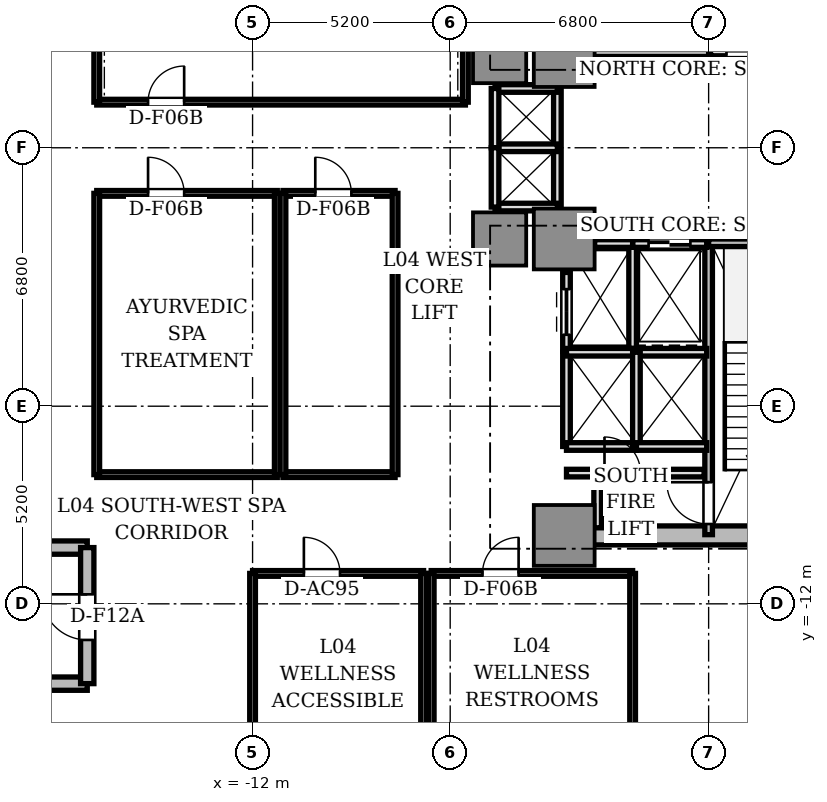
"""IFC4 building model, lengths in metres.
Left out: names, types, materials, properties, quantities, classifications, styles, units other than length and angle.
Written with IfcOpenShell. Run it as: python <this file> out.ifc"""

import sys

from ifc_helpers import new_model, si_unit, direction, frame, frame_2d, origin, origin_2d, place, context, subcontext, project, spatial, rectangle, extrude, source, transform, mapped, element, fill, save


model = new_model("IFC4")
c1 = context("Model", 3, precision=1e-05, world=origin(), true_north=direction((0.0, 1.0)))
c2 = subcontext(c1, "Body", "Model", "MODEL_VIEW")
j1 = project(units=[si_unit("LENGTHUNIT", "METRE"), si_unit("PLANEANGLEUNIT", "RADIAN")], contexts=[c1])
p1 = place(None, origin())
s1 = spatial("IfcSite", under=j1, at=p1, CompositionType="ELEMENT")
p2 = place(p1, origin())
s2 = spatial("IfcBuilding", under=s1, at=p2, CompositionType="ELEMENT")
p3 = place(p2, frame((0.0, 0.0, 18.6)))
s3 = spatial("IfcBuildingStorey", under=s2, at=p3, CompositionType="ELEMENT", Elevation=18.6)
p4 = place(p3, frame((-3.55, -10.2, 0.0), z_axis=(0.0, 0.0, 1.0), x_axis=(1.0, 0.0, 0.0)))
e1 = element("IfcWall", 1, at=p4, inside=s3, PredefinedType="SHEAR", context=c2, shape_type="SweptSolid", body=[
    extrude(rectangle(XDim=7.1, YDim=0.5, at=frame_2d((3.55, 0.0))), origin(), (0.0, 0.0, 1.0), 4.26),
])
m1 = source(origin(), c2, "Body", "SweptSolid", [
    extrude(rectangle(XDim=1.6, YDim=1.6, at=origin_2d()), origin(), (0.0, 0.0, 1.0), 4.26),
])
for number, where, z_axis, x_axis in (
    (2, (-3.8, 2.4, 0.0), (0.0, 0.0, 1.0), (1.0, 0.0, 0.0)),
    (3, (-3.8, -2.4, 0.0), (0.0, 0.0, 1.0), (1.0, 0.0, 0.0)),
    (4, (-3.8, -10.2, 0.0), (0.0, 0.0, 1.0), (1.0, 0.0, 0.0)),
):
    element("IfcColumn", number, at=place(p3, frame(where, z_axis=z_axis, x_axis=x_axis)), inside=s3, PredefinedType="COLUMN", context=c2, shape_type="MappedRepresentation", body=[
        mapped(m1, transform((0.0, 0.0, 0.0), scale=1.0)),
    ])
m2 = source(origin(), c2, "Body", "SweptSolid", [
    extrude(rectangle(XDim=1.4, YDim=1.4, at=origin_2d()), origin(), (0.0, 0.0, 1.0), 4.26),
])
for number, where, z_axis, x_axis in (
    (5, (-5.5, 2.4, 0.0), (0.0, 0.0, 1.0), (1.0, 0.0, 0.0)),
    (6, (-5.5, -2.4, 0.0), (0.0, 0.0, 1.0), (1.0, 0.0, 0.0)),
):
    element("IfcColumn", number, at=place(p3, frame(where, z_axis=z_axis, x_axis=x_axis)), inside=s3, PredefinedType="COLUMN", context=c2, shape_type="MappedRepresentation", body=[
        mapped(m2, transform((0.0, 0.0, 0.0), scale=1.0)),
    ])
p5 = place(p3, frame((0.0, 2.5, 0.0), z_axis=(0.0, 0.0, 1.0), x_axis=(0.0, 1.0, 0.0)))
e7 = element("IfcWall", 7, at=p5, inside=s3, PredefinedType="SOLIDWALL", context=c2, shape_type="SweptSolid", body=[
    extrude(rectangle(XDim=7.68, YDim=0.2, at=frame_2d((3.84, 0.0))), origin(), (0.0, 0.0, 1.0), 4.26),
])
p6 = place(p5, frame((6.5, 0.0, 0.0)))
e8 = element("IfcOpeningElement", 8, at=p6, cuts=e7, PredefinedType="OPENING", context=c2, shape_type="SweptSolid", body=[
    extrude(rectangle(XDim=0.95, YDim=2.15, at=frame_2d((0.475, 1.075))), frame((0.0, 0.11, 0.0), z_axis=(0.0, -1.0, 0.0), x_axis=(1.0, 0.0, 0.0)), (0.0, 0.0, 1.0), 0.22),
])
p7 = place(p3, frame((-3.72, 2.5, 0.0), z_axis=(0.0, 0.0, 1.0), x_axis=(1.0, 0.0, 0.0)))
e9 = element("IfcWall", 9, at=p7, inside=s3, PredefinedType="SOLIDWALL", context=c2, shape_type="SweptSolid", body=[
    extrude(rectangle(XDim=3.72, YDim=0.2, at=frame_2d((1.86, 0.0))), origin(), (0.0, 0.0, 1.0), 4.26),
])
p8 = place(p3, frame((0.0, -10.18, 0.0), z_axis=(0.0, 0.0, 1.0), x_axis=(0.0, 1.0, 0.0)))
e10 = element("IfcWall", 10, at=p8, inside=s3, PredefinedType="SOLIDWALL", context=c2, shape_type="SweptSolid", body=[
    extrude(rectangle(XDim=7.68, YDim=0.2, at=frame_2d((3.84, 0.0))), origin(), (0.0, 0.0, 1.0), 4.26),
])
p9 = place(p8, frame((0.28, 0.0, 0.0)))
e11 = element("IfcOpeningElement", 11, at=p9, cuts=e10, PredefinedType="OPENING", context=c2, shape_type="SweptSolid", body=[
    extrude(rectangle(XDim=1.1, YDim=2.15, at=frame_2d((0.55, 1.075))), frame((0.0, 0.11, 0.0), z_axis=(0.0, -1.0, 0.0), x_axis=(1.0, 0.0, 0.0)), (0.0, 0.0, 1.0), 0.22),
])
p10 = place(p3, frame((0.0, -2.5, 0.0), z_axis=(0.0, 0.0, 1.0), x_axis=(1.0, 0.0, 0.0)))
e12 = element("IfcWall", 12, at=p10, inside=s3, PredefinedType="SOLIDWALL", context=c2, shape_type="SweptSolid", body=[
    extrude(rectangle(XDim=3.72, YDim=0.2, at=frame_2d((1.86, 0.0))), origin(), (0.0, 0.0, 1.0), 4.26),
])
p11 = place(p3, frame((0.05, 2.52, 0.0), z_axis=(0.0, 0.0, 1.0), x_axis=(1.0, 0.0, 0.0)))
e13 = element("IfcWall", 13, at=p11, inside=s3, PredefinedType="SOLIDWALL", context=c2, shape_type="SweptSolid", body=[
    extrude(rectangle(XDim=1.95, YDim=0.2, at=frame_2d((0.975, 0.0))), origin(), (0.0, 0.0, 1.0), 3.81),
])
p12 = place(p11, frame((0.42, 0.0, 0.0)))
e14 = element("IfcOpeningElement", 14, at=p12, cuts=e13, PredefinedType="OPENING", context=c2, shape_type="SweptSolid", body=[
    extrude(rectangle(XDim=1.1, YDim=2.2, at=frame_2d((0.55, 1.1))), frame((0.0, 0.11, 0.0), z_axis=(0.0, -1.0, 0.0), x_axis=(1.0, 0.0, 0.0)), (0.0, 0.0, 1.0), 0.22),
])
p13 = place(p3, frame((-2.0, -5.28, 0.0), z_axis=(0.0, 0.0, 1.0), x_axis=(0.0, 1.0, 0.0)))
e15 = element("IfcWall", 15, at=p13, inside=s3, PredefinedType="SOLIDWALL", context=c2, shape_type="SweptSolid", body=[
    extrude(rectangle(XDim=2.78, YDim=0.2, at=frame_2d((1.39, 0.0))), origin(), (0.0, 0.0, 1.0), 3.81),
])
p14 = place(p3, frame((-2.0, -2.52, 0.0), z_axis=(0.0, 0.0, 1.0), x_axis=(1.0, 0.0, 0.0)))
e16 = element("IfcWall", 16, at=p14, inside=s3, PredefinedType="SOLIDWALL", context=c2, shape_type="SweptSolid", body=[
    extrude(rectangle(XDim=1.95, YDim=0.2, at=frame_2d((0.975, 0.0))), origin(), (0.0, 0.0, 1.0), 3.81),
])
p15 = place(p14, frame((0.42, 0.0, 0.0)))
e17 = element("IfcOpeningElement", 17, at=p15, cuts=e16, PredefinedType="OPENING", context=c2, shape_type="SweptSolid", body=[
    extrude(rectangle(XDim=1.1, YDim=2.2, at=frame_2d((0.55, 1.1))), frame((0.0, 0.11, 0.0), z_axis=(0.0, -1.0, 0.0), x_axis=(1.0, 0.0, 0.0)), (0.0, 0.0, 1.0), 0.22),
])
p16 = place(p3, frame((-3.0, -2.52, 0.0), z_axis=(0.0, 0.0, 1.0), x_axis=(1.0, 0.0, 0.0)))
e18 = element("IfcWall", 18, at=p16, inside=s3, PredefinedType="SOLIDWALL", context=c2, shape_type="SweptSolid", body=[
    extrude(rectangle(XDim=1.0, YDim=0.2, at=frame_2d((0.5, 0.0))), origin(), (0.0, 0.0, 1.0), 3.81),
])
p17 = place(p3, frame((-3.74, -5.36, 0.0), z_axis=(0.0, 0.0, 1.0), x_axis=(0.0, 1.0, 0.0)))
e19 = element("IfcWall", 19, at=p17, inside=s3, PredefinedType="SOLIDWALL", context=c2, shape_type="SweptSolid", body=[
    extrude(rectangle(XDim=2.08, YDim=0.2, at=frame_2d((1.04, 0.0))), origin(), (0.0, 0.0, 1.0), 3.81),
])
p18 = place(p17, frame((0.44, 0.0, 0.0)))
e20 = element("IfcOpeningElement", 20, at=p18, cuts=e19, PredefinedType="OPENING", context=c2, shape_type="SweptSolid", body=[
    extrude(rectangle(XDim=1.2, YDim=2.2, at=frame_2d((0.6, 1.1))), frame((0.0, 0.11, 0.0), z_axis=(0.0, -1.0, 0.0), x_axis=(1.0, 0.0, 0.0)), (0.0, 0.0, 1.0), 0.22),
])
p19 = place(p3, frame((-3.74, -7.86, 0.0), z_axis=(0.0, 0.0, 1.0), x_axis=(0.0, 1.0, 0.0)))
e21 = element("IfcWall", 21, at=p19, inside=s3, PredefinedType="SOLIDWALL", context=c2, shape_type="SweptSolid", body=[
    extrude(rectangle(XDim=2.48, YDim=0.2, at=frame_2d((1.24, 0.0))), origin(), (0.0, 0.0, 1.0), 3.81),
])
p20 = place(p3, frame((-3.74, -7.86, 0.0), z_axis=(0.0, 0.0, 1.0), x_axis=(1.0, 0.0, 0.0)))
e22 = element("IfcWall", 22, at=p20, inside=s3, PredefinedType="SOLIDWALL", context=c2, shape_type="SweptSolid", body=[
    extrude(rectangle(XDim=1.84, YDim=0.2, at=frame_2d((0.92, 0.0))), origin(), (0.0, 0.0, 1.0), 3.81),
])
p21 = place(p3, frame((-3.74, -5.38, 0.0), z_axis=(0.0, 0.0, 1.0), x_axis=(1.0, 0.0, 0.0)))
e23 = element("IfcWall", 23, at=p21, inside=s3, PredefinedType="SOLIDWALL", context=c2, shape_type="SweptSolid", body=[
    extrude(rectangle(XDim=3.69, YDim=0.2, at=frame_2d((1.845, 0.0))), origin(), (0.0, 0.0, 1.0), 3.81),
])
p22 = place(p3, frame((-1.9, -7.86, 0.0), z_axis=(0.0, 0.0, 1.0), x_axis=(0.0, 1.0, 0.0)))
e24 = element("IfcWall", 24, at=p22, inside=s3, PredefinedType="SOLIDWALL", context=c2, shape_type="SweptSolid", body=[
    extrude(rectangle(XDim=2.48, YDim=0.2, at=frame_2d((1.24, 0.0))), origin(), (0.0, 0.0, 1.0), 3.81),
])
p23 = place(p3, frame((-1.9, -7.86, 0.0), z_axis=(0.0, 0.0, 1.0), x_axis=(1.0, 0.0, 0.0)))
e25 = element("IfcWall", 25, at=p23, inside=s3, PredefinedType="SOLIDWALL", context=c2, shape_type="SweptSolid", body=[
    extrude(rectangle(XDim=1.85, YDim=0.2, at=frame_2d((0.925, 0.0))), origin(), (0.0, 0.0, 1.0), 3.81),
])
p24 = place(p3, frame((-3.98, -1.56, 0.0), z_axis=(0.0, 0.0, 1.0), x_axis=(0.0, 1.0, 0.0)))
e26 = element("IfcWall", 26, at=p24, inside=s3, PredefinedType="SOLIDWALL", context=c2, shape_type="SweptSolid", body=[
    extrude(rectangle(XDim=3.12, YDim=0.2, at=frame_2d((1.56, 0.0))), origin(), (0.0, 0.0, 1.0), 3.33),
])
for number, where, z_axis, x_axis in (
    (27, (-5.62, 1.56, 0.0), (0.0, 0.0, 1.0), (1.0, 0.0, 0.0)),
    (28, (-5.62, -1.56, 0.0), (0.0, 0.0, 1.0), (1.0, 0.0, 0.0)),
    (29, (-5.62, 0.0, 0.0), (0.0, 0.0, 1.0), (1.0, 0.0, 0.0)),
):
    element("IfcWall", number, at=place(p3, frame(where, z_axis=z_axis, x_axis=x_axis)), inside=s3, PredefinedType="SOLIDWALL", context=c2, shape_type="SweptSolid", body=[
        extrude(rectangle(XDim=1.64, YDim=0.2, at=frame_2d((0.82, 0.0))), origin(), (0.0, 0.0, 1.0), 3.81),
    ])
for number, where, z_axis, x_axis in (
    (30, (-5.62, 0.0, 0.0), (0.0, 0.0, 1.0), (0.0, 1.0, 0.0)),
    (31, (-5.62, -1.56, 0.0), (0.0, 0.0, 1.0), (0.0, 1.0, 0.0)),
):
    element("IfcWall", number, at=place(p3, frame(where, z_axis=z_axis, x_axis=x_axis)), inside=s3, PredefinedType="SOLIDWALL", context=c2, shape_type="SweptSolid", body=[
        extrude(rectangle(XDim=1.56, YDim=0.2, at=frame_2d((0.78, 0.0))), origin(), (0.0, 0.0, 1.0), 3.81),
    ])
p25 = place(p3, frame((-3.74, -8.56, 0.0), z_axis=(0.0, 0.0, 1.0), x_axis=(1.0, 0.0, 0.0)))
e32 = element("IfcWall", 32, at=p25, inside=s3, PredefinedType="SOLIDWALL", context=c2, shape_type="SweptSolid", body=[
    extrude(rectangle(XDim=3.62, YDim=0.2, at=frame_2d((1.81, 0.0))), origin(), (0.0, 0.0, 1.0), 3.81),
])
p26 = place(p25, frame((1.0, 0.0, 0.0)))
e33 = element("IfcOpeningElement", 33, at=p26, cuts=e32, PredefinedType="OPENING", context=c2, shape_type="SweptSolid", body=[
    extrude(rectangle(XDim=0.95, YDim=2.15, at=frame_2d((0.475, 1.075))), frame((0.0, 0.11, 0.0), z_axis=(0.0, -1.0, 0.0), x_axis=(1.0, 0.0, 0.0)), (0.0, 0.0, 1.0), 0.22),
])
p27 = place(p3, frame((-2.92, -10.0, 0.0), z_axis=(0.0, 0.0, 1.0), x_axis=(0.0, 1.0, 0.0)))
e34 = element("IfcWall", 34, at=p27, inside=s3, PredefinedType="SOLIDWALL", context=c2, shape_type="SweptSolid", body=[
    extrude(rectangle(XDim=1.44, YDim=0.2, at=frame_2d((0.72, 0.0))), origin(), (0.0, 0.0, 1.0), 3.81),
])
for number, where, z_axis, x_axis in (
    (35, (-26.6, -10.52, 0.0), (0.0, 0.0, 1.0), (1.0, 0.0, 0.0)),
    (36, (-26.6, -14.1, 0.0), (0.0, 0.0, 1.0), (1.0, 0.0, 0.0)),
):
    element("IfcWall", number, at=place(p3, frame(where, z_axis=z_axis, x_axis=x_axis)), inside=s3, PredefinedType="SHEAR", context=c2, shape_type="SweptSolid", body=[
        extrude(rectangle(XDim=10.25, YDim=0.35, at=frame_2d((5.125, 0.0))), origin(), (0.0, 0.0, 1.0), 4.26),
    ])
p28 = place(p3, frame((-16.35, -14.1, 0.0), z_axis=(0.0, 0.0, 1.0), x_axis=(0.0, 1.0, 0.0)))
e37 = element("IfcWall", 37, at=p28, inside=s3, PredefinedType="SHEAR", context=c2, shape_type="SweptSolid", body=[
    extrude(rectangle(XDim=3.58, YDim=0.35, at=frame_2d((1.79, 0.0))), origin(), (0.0, 0.0, 1.0), 4.26),
])
p29 = place(p28, frame((1.15, 0.0, 0.0)))
e38 = element("IfcOpeningElement", 38, at=p29, cuts=e37, PredefinedType="OPENING", context=c2, shape_type="SweptSolid", body=[
    extrude(rectangle(XDim=1.2, YDim=2.2, at=frame_2d((0.6, 1.1))), frame((0.0, 0.185, 0.0), z_axis=(0.0, -1.0, 0.0), x_axis=(1.0, 0.0, 0.0)), (0.0, 0.0, 1.0), 0.37),
])
p30 = place(p3, frame((-16.1, 1.2, 0.0), z_axis=(0.0, 0.0, 1.0), x_axis=(1.0, 0.0, 0.0)))
e39 = element("IfcWall", 39, at=p30, inside=s3, PredefinedType="PARTITIONING", context=c2, shape_type="SweptSolid", body=[
    extrude(rectangle(XDim=9.7, YDim=0.15, at=frame_2d((4.85, 0.0))), origin(), (0.0, 0.0, 1.0), 3.81),
])
p31 = place(p30, frame((1.35, 0.0, 0.0)))
e40 = element("IfcOpeningElement", 40, at=p31, cuts=e39, PredefinedType="OPENING", context=c2, shape_type="SweptSolid", body=[
    extrude(rectangle(XDim=0.95, YDim=2.15, at=frame_2d((0.475, 1.075))), frame((0.0, 0.085, 0.0), z_axis=(0.0, -1.0, 0.0), x_axis=(1.0, 0.0, 0.0)), (0.0, 0.0, 1.0), 0.17),
])
for number, where, z_axis, x_axis in (
    (41, (-16.1, 1.2, 0.0), (0.0, 0.0, 1.0), (0.0, 1.0, 0.0)),
    (42, (-6.4, 1.2, 0.0), (0.0, 0.0, 1.0), (0.0, 1.0, 0.0)),
):
    element("IfcWall", number, at=place(p3, frame(where, z_axis=z_axis, x_axis=x_axis)), inside=s3, PredefinedType="PARTITIONING", context=c2, shape_type="SweptSolid", body=[
        extrude(rectangle(XDim=7.4, YDim=0.15, at=frame_2d((3.7, 0.0))), origin(), (0.0, 0.0, 1.0), 3.81),
    ])
p32 = place(p3, frame((-16.1, -1.2, 0.0), z_axis=(0.0, 0.0, 1.0), x_axis=(1.0, 0.0, 0.0)))
e43 = element("IfcWall", 43, at=p32, inside=s3, PredefinedType="PARTITIONING", context=c2, shape_type="SweptSolid", body=[
    extrude(rectangle(XDim=4.75, YDim=0.15, at=frame_2d((2.375, 0.0))), origin(), (0.0, 0.0, 1.0), 3.81),
])
p33 = place(p32, frame((1.35, 0.0, 0.0)))
e44 = element("IfcOpeningElement", 44, at=p33, cuts=e43, PredefinedType="OPENING", context=c2, shape_type="SweptSolid", body=[
    extrude(rectangle(XDim=0.95, YDim=2.15, at=frame_2d((0.475, 1.075))), frame((0.0, 0.085, 0.0), z_axis=(0.0, -1.0, 0.0), x_axis=(1.0, 0.0, 0.0)), (0.0, 0.0, 1.0), 0.17),
])
p34 = place(p3, frame((-16.1, -8.6, 0.0), z_axis=(0.0, 0.0, 1.0), x_axis=(1.0, 0.0, 0.0)))
e45 = element("IfcWall", 45, at=p34, inside=s3, PredefinedType="PARTITIONING", context=c2, shape_type="SweptSolid", body=[
    extrude(rectangle(XDim=4.75, YDim=0.15, at=frame_2d((2.375, 0.0))), origin(), (0.0, 0.0, 1.0), 3.81),
])
for number, where, z_axis, x_axis in (
    (46, (-16.1, -8.6, 0.0), (0.0, 0.0, 1.0), (0.0, 1.0, 0.0)),
    (47, (-11.35, -8.6, 0.0), (0.0, 0.0, 1.0), (0.0, 1.0, 0.0)),
):
    element("IfcWall", number, at=place(p3, frame(where, z_axis=z_axis, x_axis=x_axis)), inside=s3, PredefinedType="PARTITIONING", context=c2, shape_type="SweptSolid", body=[
        extrude(rectangle(XDim=7.4, YDim=0.15, at=frame_2d((3.7, 0.0))), origin(), (0.0, 0.0, 1.0), 3.81),
    ])
p35 = place(p3, frame((-12.0, -11.2, 0.0), z_axis=(0.0, 0.0, 1.0), x_axis=(1.0, 0.0, 0.0)))
e48 = element("IfcWall", 48, at=p35, inside=s3, PredefinedType="PARTITIONING", context=c2, shape_type="SweptSolid", body=[
    extrude(rectangle(XDim=4.5, YDim=0.15, at=frame_2d((2.25, 0.0))), origin(), (0.0, 0.0, 1.0), 3.81),
])
p36 = place(p35, frame((1.35, 0.0, 0.0)))
e49 = element("IfcOpeningElement", 49, at=p36, cuts=e48, PredefinedType="OPENING", context=c2, shape_type="SweptSolid", body=[
    extrude(rectangle(XDim=0.95, YDim=2.15, at=frame_2d((0.475, 1.075))), frame((0.0, 0.085, 0.0), z_axis=(0.0, -1.0, 0.0), x_axis=(1.0, 0.0, 0.0)), (0.0, 0.0, 1.0), 0.17),
])
for number, where, z_axis, x_axis in (
    (50, (-12.0, -15.5, 0.0), (0.0, 0.0, 1.0), (0.0, 1.0, 0.0)),
    (51, (-7.5, -15.5, 0.0), (0.0, 0.0, 1.0), (0.0, 1.0, 0.0)),
):
    element("IfcWall", number, at=place(p3, frame(where, z_axis=z_axis, x_axis=x_axis)), inside=s3, PredefinedType="PARTITIONING", context=c2, shape_type="SweptSolid", body=[
        extrude(rectangle(XDim=4.3, YDim=0.15, at=frame_2d((2.15, 0.0))), origin(), (0.0, 0.0, 1.0), 3.81),
    ])
p37 = place(p3, frame((-7.3, -11.2, 0.0), z_axis=(0.0, 0.0, 1.0), x_axis=(1.0, 0.0, 0.0)))
e52 = element("IfcWall", 52, at=p37, inside=s3, PredefinedType="PARTITIONING", context=c2, shape_type="SweptSolid", body=[
    extrude(rectangle(XDim=5.3, YDim=0.15, at=frame_2d((2.65, 0.0))), origin(), (0.0, 0.0, 1.0), 3.81),
])
p38 = place(p37, frame((1.35, 0.0, 0.0)))
e53 = element("IfcOpeningElement", 53, at=p38, cuts=e52, PredefinedType="OPENING", context=c2, shape_type="SweptSolid", body=[
    extrude(rectangle(XDim=0.95, YDim=2.15, at=frame_2d((0.475, 1.075))), frame((0.0, 0.085, 0.0), z_axis=(0.0, -1.0, 0.0), x_axis=(1.0, 0.0, 0.0)), (0.0, 0.0, 1.0), 0.17),
])
for number, where, z_axis, x_axis in (
    (54, (-7.3, -15.5, 0.0), (0.0, 0.0, 1.0), (0.0, 1.0, 0.0)),
    (55, (-2.0, -15.5, 0.0), (0.0, 0.0, 1.0), (0.0, 1.0, 0.0)),
):
    element("IfcWall", number, at=place(p3, frame(where, z_axis=z_axis, x_axis=x_axis)), inside=s3, PredefinedType="PARTITIONING", context=c2, shape_type="SweptSolid", body=[
        extrude(rectangle(XDim=4.3, YDim=0.15, at=frame_2d((2.15, 0.0))), origin(), (0.0, 0.0, 1.0), 3.81),
    ])
p39 = place(p3, frame((-11.2, -1.2, 0.0), z_axis=(0.0, 0.0, 1.0), x_axis=(1.0, 0.0, 0.0)))
e56 = element("IfcWall", 56, at=p39, inside=s3, PredefinedType="PARTITIONING", context=c2, shape_type="SweptSolid", body=[
    extrude(rectangle(XDim=2.95, YDim=0.15, at=frame_2d((1.475, 0.0))), origin(), (0.0, 0.0, 1.0), 3.81),
])
p40 = place(p39, frame((0.85, 0.0, 0.0)))
e57 = element("IfcOpeningElement", 57, at=p40, cuts=e56, PredefinedType="OPENING", context=c2, shape_type="SweptSolid", body=[
    extrude(rectangle(XDim=0.95, YDim=2.15, at=frame_2d((0.475, 1.075))), frame((0.0, 0.085, 0.0), z_axis=(0.0, -1.0, 0.0), x_axis=(1.0, 0.0, 0.0)), (0.0, 0.0, 1.0), 0.17),
])
p41 = place(p3, frame((-11.2, -8.6, 0.0), z_axis=(0.0, 0.0, 1.0), x_axis=(1.0, 0.0, 0.0)))
e58 = element("IfcWall", 58, at=p41, inside=s3, PredefinedType="PARTITIONING", context=c2, shape_type="SweptSolid", body=[
    extrude(rectangle(XDim=2.95, YDim=0.15, at=frame_2d((1.475, 0.0))), origin(), (0.0, 0.0, 1.0), 3.81),
])
for number, where, z_axis, x_axis in (
    (59, (-11.2, -8.6, 0.0), (0.0, 0.0, 1.0), (0.0, 1.0, 0.0)),
    (60, (-8.25, -8.6, 0.0), (0.0, 0.0, 1.0), (0.0, 1.0, 0.0)),
):
    element("IfcWall", number, at=place(p3, frame(where, z_axis=z_axis, x_axis=x_axis)), inside=s3, PredefinedType="PARTITIONING", context=c2, shape_type="SweptSolid", body=[
        extrude(rectangle(XDim=7.4, YDim=0.15, at=frame_2d((3.7, 0.0))), origin(), (0.0, 0.0, 1.0), 3.81),
    ])
m3 = source(origin(), c2, "Body", "SweptSolid", [
    extrude(rectangle(XDim=1.1, YDim=0.05, at=origin_2d()), origin(), (0.0, 0.0, 1.0), 2.2),
])
p42 = place(p12, frame((0.55, 0.0, 0.0)))
e61 = element("IfcDoor", 61, at=p42, inside=s3, OperationType="DOUBLE_DOOR_SLIDING", PredefinedType="DOOR", context=c2, shape_type="MappedRepresentation", body=[
    mapped(m3, transform((0.0, 0.0, 0.0), scale=1.0)),
])
fill(e14, e61)
p43 = place(p15, frame((0.55, 0.0, 0.0)))
e62 = element("IfcDoor", 62, at=p43, inside=s3, OperationType="DOUBLE_DOOR_SLIDING", PredefinedType="DOOR", context=c2, shape_type="MappedRepresentation", body=[
    mapped(m3, transform((0.0, 0.0, 0.0), scale=1.0)),
])
fill(e17, e62)
m4 = source(origin(), c2, "Body", "SweptSolid", [
    extrude(rectangle(XDim=1.2, YDim=0.05, at=origin_2d()), origin(), (0.0, 0.0, 1.0), 2.2),
])
p44 = place(p18, frame((0.6, 0.0, 0.0)))
e63 = element("IfcDoor", 63, at=p44, inside=s3, OperationType="DOUBLE_DOOR_SLIDING", PredefinedType="DOOR", context=c2, shape_type="MappedRepresentation", body=[
    mapped(m4, transform((0.0, 0.0, 0.0), scale=1.0)),
])
fill(e20, e63)
m5 = source(origin(), c2, "Body", "SweptSolid", [
    extrude(rectangle(XDim=1.1, YDim=0.05, at=origin_2d()), origin(), (0.0, 0.0, 1.0), 2.15),
])
p45 = place(p9, frame((0.55, 0.0, 0.0)))
e64 = element("IfcDoor", 64, at=p45, inside=s3, OperationType="SINGLE_SWING_RIGHT", PredefinedType="DOOR", context=c2, shape_type="MappedRepresentation", body=[
    mapped(m5, transform((0.0, 0.0, 0.0), scale=1.0)),
])
fill(e11, e64)
m6 = source(origin(), c2, "Body", "SweptSolid", [
    extrude(rectangle(XDim=0.95, YDim=0.05, at=origin_2d()), origin(), (0.0, 0.0, 1.0), 2.15),
])
p46 = place(p26, frame((0.475, 0.0, 0.0)))
e65 = element("IfcDoor", 65, at=p46, inside=s3, OperationType="SINGLE_SWING_LEFT", PredefinedType="DOOR", context=c2, shape_type="MappedRepresentation", body=[
    mapped(m6, transform((0.0, 0.0, 0.0), scale=1.0)),
])
fill(e33, e65)
p47 = place(p29, frame((0.6, 0.0, 0.0)))
e66 = element("IfcDoor", 66, at=p47, inside=s3, OperationType="SINGLE_SWING_RIGHT", PredefinedType="DOOR", context=c2, shape_type="MappedRepresentation", body=[
    mapped(m4, transform((0.0, 0.0, 0.0), scale=1.0)),
])
fill(e38, e66)
p48 = place(p31, frame((0.475, 0.0, 0.0)))
e67 = element("IfcDoor", 67, at=p48, inside=s3, OperationType="SINGLE_SWING_RIGHT", PredefinedType="DOOR", context=c2, shape_type="MappedRepresentation", body=[
    mapped(m6, transform((0.0, 0.0, 0.0), scale=1.0)),
])
fill(e40, e67)
p49 = place(p33, frame((0.475, 0.0, 0.0)))
e68 = element("IfcDoor", 68, at=p49, inside=s3, OperationType="SINGLE_SWING_LEFT", PredefinedType="DOOR", context=c2, shape_type="MappedRepresentation", body=[
    mapped(m6, transform((0.0, 0.0, 0.0), scale=1.0)),
])
fill(e44, e68)
p50 = place(p36, frame((0.475, 0.0, 0.0)))
e69 = element("IfcDoor", 69, at=p50, inside=s3, OperationType="SINGLE_SWING_LEFT", PredefinedType="DOOR", context=c2, shape_type="MappedRepresentation", body=[
    mapped(m6, transform((0.0, 0.0, 0.0), scale=1.0)),
])
fill(e49, e69)
p51 = place(p38, frame((0.475, 0.0, 0.0)))
e70 = element("IfcDoor", 70, at=p51, inside=s3, OperationType="SINGLE_SWING_RIGHT", PredefinedType="DOOR", context=c2, shape_type="MappedRepresentation", body=[
    mapped(m6, transform((0.0, 0.0, 0.0), scale=1.0)),
])
fill(e53, e70)
p52 = place(p40, frame((0.475, 0.0, 0.0)))
e71 = element("IfcDoor", 71, at=p52, inside=s3, OperationType="SINGLE_SWING_LEFT", PredefinedType="DOOR", context=c2, shape_type="MappedRepresentation", body=[
    mapped(m6, transform((0.0, 0.0, 0.0), scale=1.0)),
])
fill(e57, e71)
save(model, sys.argv[1])
